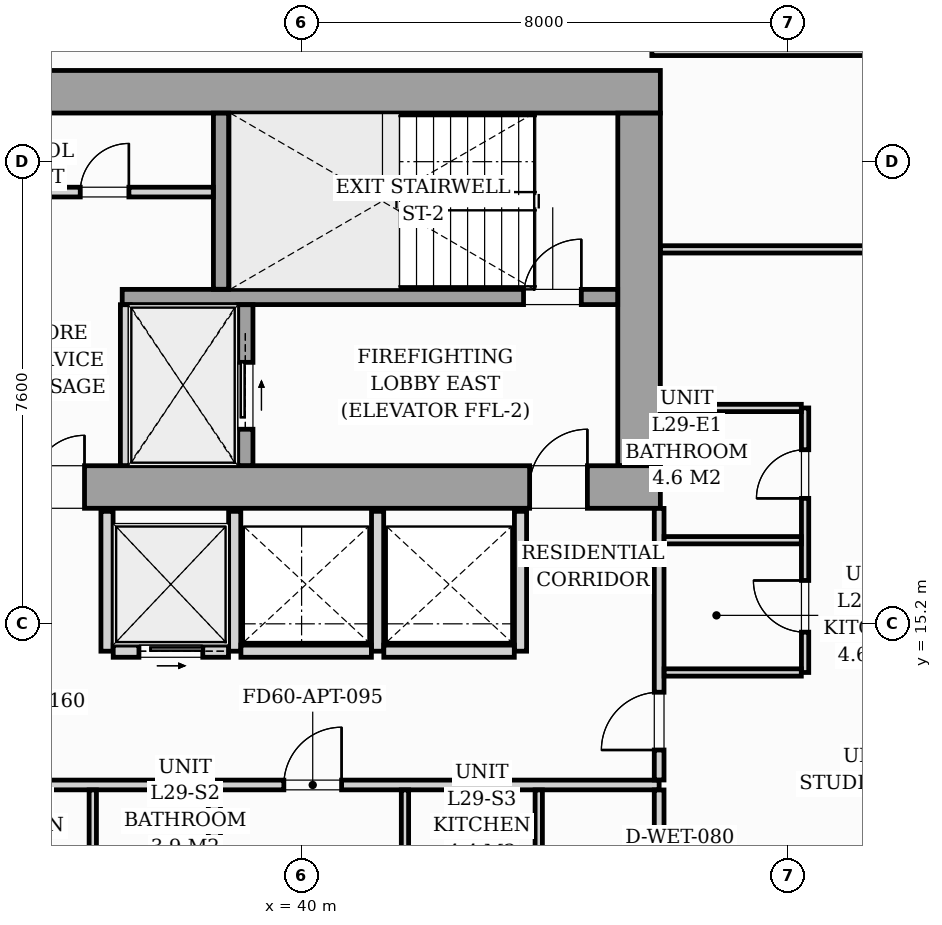
"""IFC4 building model, lengths in metres.
Left out: names, types, materials, properties, quantities, classifications, styles, units other than length and angle.
Written with IfcOpenShell. Run it as: python <this file> out.ifc"""

import sys

from ifc_helpers import new_model, si_unit, direction, frame, frame_2d, origin, origin_2d, place, context, subcontext, project, spatial, rectangle, i_section, extrude, source, transform, mapped, element, fill, save


model = new_model("IFC4")
c1 = context("Model", 3, precision=1e-05, world=origin(), true_north=direction((0.0, 1.0)))
c2 = subcontext(c1, "Body", "Model", "MODEL_VIEW")
j1 = project(units=[si_unit("LENGTHUNIT", "METRE"), si_unit("PLANEANGLEUNIT", "RADIAN")], contexts=[c1])
p1 = place(None, origin())
s1 = spatial("IfcSite", under=j1, at=p1, CompositionType="ELEMENT")
p2 = place(p1, origin())
s2 = spatial("IfcBuilding", under=s1, at=p2, CompositionType="ELEMENT")
p3 = place(p2, frame((0.0, 0.0, 103.4)))
s3 = spatial("IfcBuildingStorey", under=s2, at=p3, CompositionType="ELEMENT", Elevation=103.4)
m1 = source(origin(), c2, "Body", "SweptSolid", [
    extrude(i_section(OverallWidth=0.427, OverallDepth=0.483, WebThickness=0.051, FlangeThickness=0.082, FilletRadius=0.018, at=origin_2d()), origin(), (0.0, 0.0, 1.0), 3.196),
])
for number, where, z_axis, x_axis in (
    (1, (38.88, 17.4, 0.002), (0.0, 0.0, 1.0), (1.0, 0.0, 0.0)),
    (2, (45.6, 17.4, 0.002), (0.0, 0.0, 1.0), (1.0, 0.0, 0.0)),
    (3, (38.88, 24.0, 0.002), (0.0, 0.0, 1.0), (1.0, 0.0, 0.0)),
    (4, (45.6, 24.0, 0.002), (0.0, 0.0, 1.0), (1.0, 0.0, 0.0)),
):
    element("IfcColumn", number, at=place(p3, frame(where, z_axis=z_axis, x_axis=x_axis)), inside=s3, PredefinedType="PILASTER", context=c2, shape_type="MappedRepresentation", body=[
        mapped(m1, transform((0.0, 0.0, 0.0), scale=1.0)),
    ])
p4 = place(p3, frame((26.1, 17.45, 0.0), z_axis=(0.0, 0.0, 1.0), x_axis=(1.0, 0.0, 0.0)))
e5 = element("IfcWall", 5, at=p4, inside=s3, PredefinedType="SHEAR", context=c2, shape_type="SweptSolid", body=[
    extrude(rectangle(XDim=19.8, YDim=0.7, at=frame_2d((9.9, 0.0))), origin(), (0.0, 0.0, 1.0), 3.2),
])
p5 = place(p4, frame((1.05, 0.0, 0.0)))
e6 = element("IfcOpeningElement", 6, at=p5, cuts=e5, PredefinedType="OPENING", context=c2, shape_type="SweptSolid", body=[
    extrude(rectangle(XDim=0.95, YDim=2.06, at=frame_2d((0.475, 1.03))), frame((0.0, 0.36, 0.0), z_axis=(0.0, -1.0, 0.0), x_axis=(1.0, 0.0, 0.0)), (0.0, 0.0, 1.0), 0.72),
])
p6 = place(p4, frame((9.48, 0.0, 0.0)))
e7 = element("IfcOpeningElement", 7, at=p6, cuts=e5, PredefinedType="OPENING", context=c2, shape_type="SweptSolid", body=[
    extrude(rectangle(XDim=0.85, YDim=2.0, at=frame_2d((0.425, 1.0))), frame((0.0, 0.36, 0.0), z_axis=(0.0, -1.0, 0.0), x_axis=(1.0, 0.0, 0.0)), (0.0, 0.0, 1.0), 0.72),
])
p7 = place(p4, frame((17.65, 0.0, 0.0)))
e8 = element("IfcOpeningElement", 8, at=p7, cuts=e5, PredefinedType="OPENING", context=c2, shape_type="SweptSolid", body=[
    extrude(rectangle(XDim=0.95, YDim=2.06, at=frame_2d((0.475, 1.03))), frame((0.0, 0.36, 0.0), z_axis=(0.0, -1.0, 0.0), x_axis=(1.0, 0.0, 0.0)), (0.0, 0.0, 1.0), 0.72),
])
p8 = place(p3, frame((26.1, 23.95, 0.0), z_axis=(0.0, 0.0, 1.0), x_axis=(1.0, 0.0, 0.0)))
e9 = element("IfcWall", 9, at=p8, inside=s3, PredefinedType="SHEAR", context=c2, shape_type="SweptSolid", body=[
    extrude(rectangle(XDim=19.8, YDim=0.7, at=frame_2d((9.9, 0.0))), origin(), (0.0, 0.0, 1.0), 3.2),
])
p9 = place(p3, frame((45.55, 17.802, 0.0), z_axis=(0.0, 0.0, 1.0), x_axis=(0.0, 1.0, 0.0)))
e10 = element("IfcWall", 10, at=p9, inside=s3, PredefinedType="SHEAR", context=c2, shape_type="SweptSolid", body=[
    extrude(rectangle(XDim=5.796, YDim=0.7, at=frame_2d((2.898, 0.0))), origin(), (0.0, 0.0, 1.0), 3.2),
])
p10 = place(p3, frame((37.05, 20.575, 0.0), z_axis=(0.0, 0.0, 1.0), x_axis=(1.0, 0.0, 0.0)))
e11 = element("IfcWall", 11, at=p10, inside=s3, PredefinedType="SOLIDWALL", context=c2, shape_type="SweptSolid", body=[
    extrude(rectangle(XDim=8.148, YDim=0.25, at=frame_2d((4.074, 0.0))), origin(), (0.0, 0.0, 1.0), 3.2),
])
p11 = place(p10, frame((6.6, 0.0, 0.0)))
e12 = element("IfcOpeningElement", 12, at=p11, cuts=e11, PredefinedType="OPENING", context=c2, shape_type="SweptSolid", body=[
    extrude(rectangle(XDim=0.95, YDim=2.06, at=frame_2d((0.475, 1.03))), frame((0.0, 0.135, 0.0), z_axis=(0.0, -1.0, 0.0), x_axis=(1.0, 0.0, 0.0)), (0.0, 0.0, 1.0), 0.27),
])
p12 = place(p3, frame((38.675, 20.702, 0.0), z_axis=(0.0, 0.0, 1.0), x_axis=(0.0, 1.0, 0.0)))
e13 = element("IfcWall", 13, at=p12, inside=s3, PredefinedType="SOLIDWALL", context=c2, shape_type="SweptSolid", body=[
    extrude(rectangle(XDim=2.896, YDim=0.25, at=frame_2d((1.448, 0.0))), origin(), (0.0, 0.0, 1.0), 3.2),
])
p13 = place(p3, frame((37.1, 17.802, 0.0), z_axis=(0.0, 0.0, 1.0), x_axis=(0.0, 1.0, 0.0)))
e14 = element("IfcWall", 14, at=p13, inside=s3, PredefinedType="PARTITIONING", context=c2, shape_type="SweptSolid", body=[
    extrude(rectangle(XDim=2.646, YDim=0.16, at=frame_2d((1.323, 0.0))), origin(), (0.0, 0.0, 1.0), 2.94),
])
p14 = place(p3, frame((39.075, 17.802, 0.0), z_axis=(0.0, 0.0, 1.0), x_axis=(0.0, 1.0, 0.0)))
e15 = element("IfcWall", 15, at=p14, inside=s3, PredefinedType="SOLIDWALL", context=c2, shape_type="SweptSolid", body=[
    extrude(rectangle(XDim=2.646, YDim=0.25, at=frame_2d((1.323, 0.0))), origin(), (0.0, 0.0, 1.0), 3.2),
])
p15 = place(p14, frame((0.598, 0.0, 0.0)))
e16 = element("IfcOpeningElement", 16, at=p15, cuts=e15, PredefinedType="OPENING", context=c2, shape_type="SweptSolid", body=[
    extrude(rectangle(XDim=1.1, YDim=2.08, at=frame_2d((0.55, 1.04))), frame((0.0, 0.135, 0.0), z_axis=(0.0, -1.0, 0.0), x_axis=(1.0, 0.0, 0.0)), (0.0, 0.0, 1.0), 0.27),
])
p16 = place(p3, frame((34.982, 22.3, 0.0), z_axis=(0.0, 0.0, 1.0), x_axis=(1.0, 0.0, 0.0)))
e17 = element("IfcWall", 17, at=p16, inside=s3, PredefinedType="PARTITIONING", context=c2, shape_type="SweptSolid", body=[
    extrude(rectangle(XDim=3.566, YDim=0.16, at=frame_2d((1.783, 0.0))), origin(), (0.0, 0.0, 1.0), 2.94),
])
p17 = place(p16, frame((1.378, 0.0, 0.0)))
e18 = element("IfcOpeningElement", 18, at=p17, cuts=e17, PredefinedType="OPENING", context=c2, shape_type="SweptSolid", body=[
    extrude(rectangle(XDim=0.8, YDim=2.05, at=frame_2d((0.4, 1.025))), frame((0.0, 0.09, 0.0), z_axis=(0.0, -1.0, 0.0), x_axis=(1.0, 0.0, 0.0)), (0.0, 0.0, 1.0), 0.18),
])
for number, where, z_axis, x_axis in (
    (19, (36.8, 14.75, 0.0), (0.0, 0.0, 1.0), (0.0, 1.0, 0.0)),
    (20, (38.9, 14.75, 0.0), (0.0, 0.0, 1.0), (0.0, 1.0, 0.0)),
):
    element("IfcWall", number, at=place(p3, frame(where, z_axis=z_axis, x_axis=x_axis)), inside=s3, PredefinedType="PARTITIONING", context=c2, shape_type="SweptSolid", body=[
        extrude(rectangle(XDim=2.3, YDim=0.2, at=frame_2d((1.15, 0.0))), origin(), (0.0, 0.0, 1.0), 2.94),
    ])
p18 = place(p3, frame((36.902, 14.75, 0.0), z_axis=(0.0, 0.0, 1.0), x_axis=(1.0, 0.0, 0.0)))
e21 = element("IfcWall", 21, at=p18, inside=s3, PredefinedType="PARTITIONING", context=c2, shape_type="SweptSolid", body=[
    extrude(rectangle(XDim=1.896, YDim=0.2, at=frame_2d((0.948, 0.0))), origin(), (0.0, 0.0, 1.0), 2.94),
])
p19 = place(p18, frame((0.423, 0.0, 0.0)))
e22 = element("IfcOpeningElement", 22, at=p19, cuts=e21, PredefinedType="OPENING", context=c2, shape_type="SweptSolid", body=[
    extrude(rectangle(XDim=1.05, YDim=2.08, at=frame_2d((0.525, 1.04))), frame((0.0, 0.11, 0.0), z_axis=(0.0, -1.0, 0.0), x_axis=(1.0, 0.0, 0.0)), (0.0, 0.0, 1.0), 0.22),
])
for number, where, z_axis, x_axis in (
    (23, (41.25, 14.75, 0.0), (0.0, 0.0, 1.0), (0.0, 1.0, 0.0)),
    (24, (43.6, 14.75, 0.0), (0.0, 0.0, 1.0), (0.0, 1.0, 0.0)),
):
    element("IfcWall", number, at=place(p3, frame(where, z_axis=z_axis, x_axis=x_axis)), inside=s3, PredefinedType="PARTITIONING", context=c2, shape_type="SweptSolid", body=[
        extrude(rectangle(XDim=2.3, YDim=0.2, at=frame_2d((1.15, 0.0))), origin(), (0.0, 0.0, 1.0), 2.94),
    ])
for number, where, z_axis, x_axis in (
    (25, (39.002, 14.75, 0.0), (0.0, 0.0, 1.0), (1.0, 0.0, 0.0)),
    (26, (41.352, 14.75, 0.0), (0.0, 0.0, 1.0), (1.0, 0.0, 0.0)),
):
    element("IfcWall", number, at=place(p3, frame(where, z_axis=z_axis, x_axis=x_axis)), inside=s3, PredefinedType="PARTITIONING", context=c2, shape_type="SweptSolid", body=[
        extrude(rectangle(XDim=2.146, YDim=0.2, at=frame_2d((1.073, 0.0))), origin(), (0.0, 0.0, 1.0), 2.94),
    ])
p20 = place(p3, frame((21.5, 12.55, 0.0), z_axis=(0.0, 0.0, 1.0), x_axis=(1.0, 0.0, 0.0)))
e27 = element("IfcWall", 27, at=p20, inside=s3, PredefinedType="PARTITIONING", context=c2, shape_type="SweptSolid", body=[
    extrude(rectangle(XDim=24.38, YDim=0.16, at=frame_2d((12.19, 0.0))), origin(), (0.0, 0.0, 1.0), 2.94),
])
p21 = place(p20, frame((6.075, 0.0, 0.0)))
e28 = element("IfcOpeningElement", 28, at=p21, cuts=e27, PredefinedType="OPENING", context=c2, shape_type="SweptSolid", body=[
    extrude(rectangle(XDim=0.95, YDim=2.06, at=frame_2d((0.475, 1.03))), frame((0.0, 0.09, 0.0), z_axis=(0.0, -1.0, 0.0), x_axis=(1.0, 0.0, 0.0)), (0.0, 0.0, 1.0), 0.18),
])
p22 = place(p20, frame((10.519, 0.0, 0.0)))
e29 = element("IfcOpeningElement", 29, at=p22, cuts=e27, PredefinedType="OPENING", context=c2, shape_type="SweptSolid", body=[
    extrude(rectangle(XDim=0.95, YDim=2.06, at=frame_2d((0.475, 1.03))), frame((0.0, 0.09, 0.0), z_axis=(0.0, -1.0, 0.0), x_axis=(1.0, 0.0, 0.0)), (0.0, 0.0, 1.0), 0.18),
])
p23 = place(p20, frame((18.208, 0.0, 0.0)))
e30 = element("IfcOpeningElement", 30, at=p23, cuts=e27, PredefinedType="OPENING", context=c2, shape_type="SweptSolid", body=[
    extrude(rectangle(XDim=0.95, YDim=2.06, at=frame_2d((0.475, 1.03))), frame((0.0, 0.09, 0.0), z_axis=(0.0, -1.0, 0.0), x_axis=(1.0, 0.0, 0.0)), (0.0, 0.0, 1.0), 0.18),
])
p24 = place(p3, frame((45.88, 6.977, 0.0), z_axis=(0.0, 0.0, 1.0), x_axis=(0.0, 1.0, 0.0)))
e31 = element("IfcWall", 31, at=p24, inside=s3, PredefinedType="PARTITIONING", context=c2, shape_type="SweptSolid", body=[
    extrude(rectangle(XDim=5.491, YDim=0.16, at=frame_2d((2.745, 0.0))), origin(), (0.0, 0.0, 1.0), 2.94),
])
p25 = place(p3, frame((45.88, 12.632, 0.0), z_axis=(0.0, 0.0, 1.0), x_axis=(0.0, 1.0, 0.0)))
e32 = element("IfcWall", 32, at=p25, inside=s3, PredefinedType="PARTITIONING", context=c2, shape_type="SweptSolid", body=[
    extrude(rectangle(XDim=4.466, YDim=0.16, at=frame_2d((2.233, 0.0))), origin(), (0.0, 0.0, 1.0), 2.94),
])
p26 = place(p25, frame((0.493, 0.0, 0.0)))
e33 = element("IfcOpeningElement", 33, at=p26, cuts=e32, PredefinedType="OPENING", context=c2, shape_type="SweptSolid", body=[
    extrude(rectangle(XDim=0.95, YDim=2.06, at=frame_2d((0.475, 1.03))), frame((0.0, 0.09, 0.0), z_axis=(0.0, -1.0, 0.0), x_axis=(1.0, 0.0, 0.0)), (0.0, 0.0, 1.0), 0.18),
])
p27 = place(p3, frame((36.566, 10.362, 0.0), z_axis=(0.0, 0.0, 1.0), x_axis=(0.0, 1.0, 0.0)))
e34 = element("IfcWall", 34, at=p27, inside=s3, PredefinedType="PARTITIONING", context=c2, shape_type="SweptSolid", body=[
    extrude(rectangle(XDim=2.106, YDim=0.12, at=frame_2d((1.053, 0.0))), origin(), (0.0, 0.0, 1.0), 2.94),
])
p28 = place(p3, frame((38.566, 10.362, 0.0), z_axis=(0.0, 0.0, 1.0), x_axis=(0.0, 1.0, 0.0)))
e35 = element("IfcWall", 35, at=p28, inside=s3, PredefinedType="PARTITIONING", context=c2, shape_type="SweptSolid", body=[
    extrude(rectangle(XDim=2.106, YDim=0.2, at=frame_2d((1.053, 0.0))), origin(), (0.0, 0.0, 1.0), 2.94),
])
for number, where, z_axis, x_axis in (
    (36, (41.7, 10.362, 0.0), (0.0, 0.0, 1.0), (0.0, 1.0, 0.0)),
    (37, (43.9, 10.362, 0.0), (0.0, 0.0, 1.0), (0.0, 1.0, 0.0)),
):
    element("IfcWall", number, at=place(p3, frame(where, z_axis=z_axis, x_axis=x_axis)), inside=s3, PredefinedType="PARTITIONING", context=c2, shape_type="SweptSolid", body=[
        extrude(rectangle(XDim=2.106, YDim=0.12, at=frame_2d((1.053, 0.0))), origin(), (0.0, 0.0, 1.0), 2.94),
    ])
p29 = place(p3, frame((48.28, 14.4, 0.0), z_axis=(0.0, 0.0, 1.0), x_axis=(0.0, 1.0, 0.0)))
e38 = element("IfcWall", 38, at=p29, inside=s3, PredefinedType="PARTITIONING", context=c2, shape_type="SweptSolid", body=[
    extrude(rectangle(XDim=4.35, YDim=0.12, at=frame_2d((2.175, 0.0))), origin(), (0.0, 0.0, 1.0), 2.94),
])
p30 = place(p29, frame((0.663, 0.0, 0.0)))
e39 = element("IfcOpeningElement", 39, at=p30, cuts=e38, PredefinedType="OPENING", context=c2, shape_type="SweptSolid", body=[
    extrude(rectangle(XDim=0.85, YDim=2.05, at=frame_2d((0.425, 1.025))), frame((0.0, 0.07, 0.0), z_axis=(0.0, -1.0, 0.0), x_axis=(1.0, 0.0, 0.0)), (0.0, 0.0, 1.0), 0.14),
])
p31 = place(p29, frame((2.863, 0.0, 0.0)))
e40 = element("IfcOpeningElement", 40, at=p31, cuts=e38, PredefinedType="OPENING", context=c2, shape_type="SweptSolid", body=[
    extrude(rectangle(XDim=0.8, YDim=2.02, at=frame_2d((0.4, 1.01))), frame((0.0, 0.07, 0.0), z_axis=(0.0, -1.0, 0.0), x_axis=(1.0, 0.0, 0.0)), (0.0, 0.0, 1.0), 0.14),
])
for number, where, z_axis, x_axis in (
    (41, (45.962, 16.575, 0.0), (0.0, 0.0, 1.0), (1.0, 0.0, 0.0)),
    (42, (45.962, 14.4, 0.0), (0.0, 0.0, 1.0), (1.0, 0.0, 0.0)),
):
    element("IfcWall", number, at=place(p3, frame(where, z_axis=z_axis, x_axis=x_axis)), inside=s3, PredefinedType="PARTITIONING", context=c2, shape_type="SweptSolid", body=[
        extrude(rectangle(XDim=2.256, YDim=0.12, at=frame_2d((1.128, 0.0))), origin(), (0.0, 0.0, 1.0), 2.94),
    ])
p32 = place(p3, frame((45.902, 18.75, 0.0), z_axis=(0.0, 0.0, 1.0), x_axis=(1.0, 0.0, 0.0)))
e43 = element("IfcWall", 43, at=p32, inside=s3, PredefinedType="PARTITIONING", context=c2, shape_type="SweptSolid", body=[
    extrude(rectangle(XDim=2.316, YDim=0.12, at=frame_2d((1.158, 0.0))), origin(), (0.0, 0.0, 1.0), 2.94),
])
p33 = place(p3, frame((45.76, 24.605, 0.0), z_axis=(0.0, 0.0, 1.0), x_axis=(1.0, 0.0, 0.0)))
e44 = element("IfcWall", 44, at=p33, inside=s3, PredefinedType="PARTITIONING", context=c2, shape_type="SweptSolid", body=[
    extrude(rectangle(XDim=22.498, YDim=0.12, at=frame_2d((11.249, 0.0))), origin(), (0.0, 0.0, 1.0), 2.94),
])
p34 = place(p33, frame((10.931, 0.0, 0.0)))
e45 = element("IfcOpeningElement", 45, at=p34, cuts=e44, PredefinedType="OPENING", context=c2, shape_type="SweptSolid", body=[
    extrude(rectangle(XDim=0.85, YDim=2.05, at=frame_2d((0.425, 1.025))), frame((0.0, 0.07, 0.0), z_axis=(0.0, -1.0, 0.0), x_axis=(1.0, 0.0, 0.0)), (0.0, 0.0, 1.0), 0.14),
])
p35 = place(p3, frame((45.902, 21.358, 0.0), z_axis=(0.0, 0.0, 1.0), x_axis=(1.0, 0.0, 0.0)))
e46 = element("IfcWall", 46, at=p35, inside=s3, PredefinedType="PARTITIONING", context=c2, shape_type="SweptSolid", body=[
    extrude(rectangle(XDim=22.668, YDim=0.12, at=frame_2d((11.334, 0.0))), origin(), (0.0, 0.0, 1.0), 2.94),
])
p36 = place(p35, frame((10.945, 0.0, 0.0)))
e47 = element("IfcOpeningElement", 47, at=p36, cuts=e46, PredefinedType="OPENING", context=c2, shape_type="SweptSolid", body=[
    extrude(rectangle(XDim=0.85, YDim=2.05, at=frame_2d((0.425, 1.025))), frame((0.0, 0.07, 0.0), z_axis=(0.0, -1.0, 0.0), x_axis=(1.0, 0.0, 0.0)), (0.0, 0.0, 1.0), 0.14),
])
m2 = source(origin(), c2, "Body", "SweptSolid", [
    extrude(rectangle(XDim=0.85, YDim=2.0, at=frame_2d((0.425, 1.0))), frame((0.0, 0.025, 0.0), z_axis=(0.0, -1.0, 0.0), x_axis=(1.0, 0.0, 0.0)), (0.0, 0.0, 1.0), 0.05),
])
p37 = place(p6, origin())
e48 = element("IfcDoor", 48, at=p37, inside=s3, OperationType="SINGLE_SWING_RIGHT", PredefinedType="DOOR", context=c2, shape_type="MappedRepresentation", body=[
    mapped(m2, transform((0.0, 0.0, 0.0), scale=1.0)),
])
fill(e7, e48)
m3 = source(origin(), c2, "Body", "SweptSolid", [
    extrude(rectangle(XDim=0.95, YDim=2.06, at=frame_2d((0.475, 1.03))), frame((0.0, 0.025, 0.0), z_axis=(0.0, -1.0, 0.0), x_axis=(1.0, 0.0, 0.0)), (0.0, 0.0, 1.0), 0.05),
])
p38 = place(p7, origin())
e49 = element("IfcDoor", 49, at=p38, inside=s3, OperationType="SINGLE_SWING_RIGHT", PredefinedType="DOOR", context=c2, shape_type="MappedRepresentation", body=[
    mapped(m3, transform((0.0, 0.0, 0.0), scale=1.0)),
])
fill(e8, e49)
p39 = place(p11, origin())
e50 = element("IfcDoor", 50, at=p39, inside=s3, OperationType="SINGLE_SWING_RIGHT", PredefinedType="DOOR", context=c2, shape_type="MappedRepresentation", body=[
    mapped(m3, transform((0.0, 0.0, 0.0), scale=1.0)),
])
fill(e12, e50)
m4 = source(origin(), c2, "Body", "SweptSolid", [
    extrude(rectangle(XDim=1.1, YDim=2.08, at=frame_2d((0.55, 1.04))), frame((0.0, 0.025, 0.0), z_axis=(0.0, -1.0, 0.0), x_axis=(1.0, 0.0, 0.0)), (0.0, 0.0, 1.0), 0.05),
])
p40 = place(p15, origin())
e51 = element("IfcDoor", 51, at=p40, inside=s3, OperationType="SLIDING_TO_RIGHT", PredefinedType="DOOR", context=c2, shape_type="MappedRepresentation", body=[
    mapped(m4, transform((0.0, 0.0, 0.0), scale=1.0)),
])
fill(e16, e51)
m5 = source(origin(), c2, "Body", "SweptSolid", [
    extrude(rectangle(XDim=0.8, YDim=2.05, at=frame_2d((0.4, 1.025))), frame((0.0, 0.025, 0.0), z_axis=(0.0, -1.0, 0.0), x_axis=(1.0, 0.0, 0.0)), (0.0, 0.0, 1.0), 0.05),
])
p41 = place(p17, origin())
e52 = element("IfcDoor", 52, at=p41, inside=s3, OperationType="SINGLE_SWING_RIGHT", PredefinedType="DOOR", context=c2, shape_type="MappedRepresentation", body=[
    mapped(m5, transform((0.0, 0.0, 0.0), scale=1.0)),
])
fill(e18, e52)
m6 = source(origin(), c2, "Body", "SweptSolid", [
    extrude(rectangle(XDim=1.05, YDim=2.08, at=frame_2d((0.525, 1.04))), frame((0.0, 0.025, 0.0), z_axis=(0.0, -1.0, 0.0), x_axis=(1.0, 0.0, 0.0)), (0.0, 0.0, 1.0), 0.05),
])
p42 = place(p19, origin())
e53 = element("IfcDoor", 53, at=p42, inside=s3, OperationType="SLIDING_TO_RIGHT", PredefinedType="DOOR", context=c2, shape_type="MappedRepresentation", body=[
    mapped(m6, transform((0.0, 0.0, 0.0), scale=1.0)),
])
fill(e22, e53)
m7 = source(origin(), c2, "Body", "SweptSolid", [
    extrude(rectangle(XDim=0.95, YDim=2.06, at=frame_2d((0.475, 1.03))), frame((0.0, 0.025, 0.0), z_axis=(0.0, -1.0, 0.0), x_axis=(1.0, 0.0, 0.0)), (0.0, 0.0, 1.0), 0.05),
])
p43 = place(p23, origin())
e54 = element("IfcDoor", 54, at=p43, inside=s3, OperationType="SINGLE_SWING_RIGHT", PredefinedType="DOOR", context=c2, shape_type="MappedRepresentation", body=[
    mapped(m7, transform((0.0, 0.0, 0.0), scale=1.0)),
])
fill(e30, e54)
p44 = place(p26, origin())
e55 = element("IfcDoor", 55, at=p44, inside=s3, OperationType="SINGLE_SWING_LEFT", PredefinedType="DOOR", context=c2, shape_type="MappedRepresentation", body=[
    mapped(m7, transform((0.0, 0.0, 0.0), scale=1.0)),
])
fill(e33, e55)
m8 = source(origin(), c2, "Body", "SweptSolid", [
    extrude(rectangle(XDim=0.85, YDim=2.05, at=frame_2d((0.425, 1.025))), frame((0.0, 0.025, 0.0), z_axis=(0.0, -1.0, 0.0), x_axis=(1.0, 0.0, 0.0)), (0.0, 0.0, 1.0), 0.05),
])
p45 = place(p30, origin())
e56 = element("IfcDoor", 56, at=p45, inside=s3, OperationType="SINGLE_SWING_RIGHT", PredefinedType="DOOR", context=c2, shape_type="MappedRepresentation", body=[
    mapped(m8, transform((0.0, 0.0, 0.0), scale=1.0)),
])
fill(e39, e56)
m9 = source(origin(), c2, "Body", "SweptSolid", [
    extrude(rectangle(XDim=0.8, YDim=2.02, at=frame_2d((0.4, 1.01))), frame((0.0, 0.025, 0.0), z_axis=(0.0, -1.0, 0.0), x_axis=(1.0, 0.0, 0.0)), (0.0, 0.0, 1.0), 0.05),
])
p46 = place(p31, origin())
e57 = element("IfcDoor", 57, at=p46, inside=s3, OperationType="SINGLE_SWING_LEFT", PredefinedType="DOOR", context=c2, shape_type="MappedRepresentation", body=[
    mapped(m9, transform((0.0, 0.0, 0.0), scale=1.0)),
])
fill(e40, e57)
save(model, sys.argv[1])
